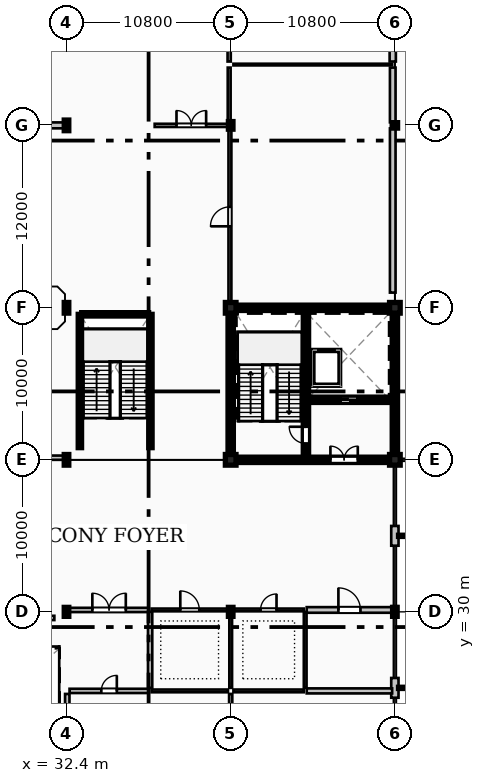
"""IFC4 building model, lengths in metres.
Left out: names, types, materials, properties, quantities, classifications, styles, units other than length and angle.
Written with IfcOpenShell. Run it as: python <this file> out.ifc"""

import sys

from ifc_helpers import new_model, si_unit, direction, frame, frame_2d, origin, origin_2d, place, context, subcontext, project, spatial, rectangle, hollow_circle, i_section, extrude, element, fill, save


model = new_model("IFC4")
c1 = context("Model", 3, precision=1e-05, world=origin(), true_north=direction((0.0, 1.0)))
c2 = subcontext(c1, "Body", "Model", "MODEL_VIEW")
j1 = project(units=[si_unit("LENGTHUNIT", "METRE"), si_unit("PLANEANGLEUNIT", "RADIAN")], contexts=[c1])
p1 = place(None, origin())
s1 = spatial("IfcSite", under=j1, at=p1, CompositionType="ELEMENT")
p2 = place(p1, origin())
s2 = spatial("IfcBuilding", under=s1, at=p2, CompositionType="ELEMENT")
p3 = place(p2, frame((0.0, 0.0, 4.8)))
s3 = spatial("IfcBuildingStorey", under=s2, at=p3, CompositionType="ELEMENT", Elevation=4.8)
p4 = place(p3, frame((32.4, 30.0, 0.0), z_axis=(0.0, 0.0, 1.0), x_axis=(1.0, 0.0, 0.0)))
e1 = element("IfcColumn", 1, at=p4, inside=s3, PredefinedType="COLUMN", context=c2, shape_type="SweptSolid", body=[
    extrude(i_section(OverallWidth=0.3, OverallDepth=0.59, WebThickness=0.013, FlangeThickness=0.025, FilletRadius=0.027, at=origin_2d()), origin(), (0.0, 0.0, 1.0), 4.8),
])
for number, where, z_axis, x_axis in (
    (2, (32.4, 40.0, 0.0), (0.0, 0.0, 1.0), (1.0, 0.0, 0.0)),
    (3, (32.4, 50.0, 0.0), (0.0, 0.0, 1.0), (1.0, 0.0, 0.0)),
    (4, (32.4, 62.0, 0.0), (0.0, 0.0, 1.0), (1.0, 0.0, 0.0)),
):
    element("IfcColumn", number, at=place(p3, frame(where, z_axis=z_axis, x_axis=x_axis)), inside=s3, PredefinedType="COLUMN", context=c2, shape_type="SweptSolid", body=[
        extrude(i_section(OverallWidth=0.3, OverallDepth=0.7, WebThickness=0.017, FlangeThickness=0.032, FilletRadius=0.027, at=origin_2d()), origin(), (0.0, 0.0, 1.0), 4.8),
    ])
p5 = place(p3, frame((43.2, 30.0, 0.0), z_axis=(0.0, 0.0, 1.0), x_axis=(1.0, 0.0, 0.0)))
e5 = element("IfcColumn", 5, at=p5, inside=s3, PredefinedType="COLUMN", context=c2, shape_type="SweptSolid", body=[
    extrude(i_section(OverallWidth=0.3, OverallDepth=0.59, WebThickness=0.013, FlangeThickness=0.025, FilletRadius=0.027, at=origin_2d()), origin(), (0.0, 0.0, 1.0), 4.8),
])
for number, where, z_axis, x_axis in (
    (6, (43.2, 40.0, 0.0), (0.0, 0.0, 1.0), (1.0, 0.0, 0.0)),
    (7, (43.2, 50.0, 0.0), (0.0, 0.0, 1.0), (1.0, 0.0, 0.0)),
):
    element("IfcColumn", number, at=place(p3, frame(where, z_axis=z_axis, x_axis=x_axis)), inside=s3, PredefinedType="COLUMN", context=c2, shape_type="SweptSolid", body=[
        extrude(rectangle(XDim=0.7, YDim=0.7, at=origin_2d()), origin(), (0.0, 0.0, 1.0), 4.8),
    ])
p6 = place(p3, frame((43.2, 62.0, 0.0), z_axis=(0.0, 0.0, 1.0), x_axis=(1.0, 0.0, 0.0)))
e8 = element("IfcColumn", 8, at=p6, inside=s3, PredefinedType="COLUMN", context=c2, shape_type="SweptSolid", body=[
    extrude(i_section(OverallWidth=0.3, OverallDepth=0.5, WebThickness=0.014, FlangeThickness=0.028, FilletRadius=0.027, at=origin_2d()), origin(), (0.0, 0.0, 1.0), 4.8),
])
p7 = place(p3, frame((54.0, 30.0, 0.0), z_axis=(0.0, 0.0, 1.0), x_axis=(1.0, 0.0, 0.0)))
e9 = element("IfcColumn", 9, at=p7, inside=s3, PredefinedType="COLUMN", context=c2, shape_type="SweptSolid", body=[
    extrude(i_section(OverallWidth=0.3, OverallDepth=0.59, WebThickness=0.013, FlangeThickness=0.025, FilletRadius=0.027, at=origin_2d()), origin(), (0.0, 0.0, 1.0), 4.8),
])
for number, where, z_axis, x_axis in (
    (10, (54.0, 40.0, 0.0), (0.0, 0.0, 1.0), (1.0, 0.0, 0.0)),
    (11, (54.0, 50.0, 0.0), (0.0, 0.0, 1.0), (1.0, 0.0, 0.0)),
):
    element("IfcColumn", number, at=place(p3, frame(where, z_axis=z_axis, x_axis=x_axis)), inside=s3, PredefinedType="COLUMN", context=c2, shape_type="SweptSolid", body=[
        extrude(rectangle(XDim=0.7, YDim=0.7, at=origin_2d()), origin(), (0.0, 0.0, 1.0), 4.8),
    ])
p8 = place(p3, frame((54.0, 62.0, 0.0), z_axis=(0.0, 0.0, 1.0), x_axis=(1.0, 0.0, 0.0)))
e12 = element("IfcColumn", 12, at=p8, inside=s3, PredefinedType="COLUMN", context=c2, shape_type="SweptSolid", body=[
    extrude(hollow_circle(Radius=0.178, WallThickness=0.016, at=origin_2d()), origin(), (0.0, 0.0, 1.0), 4.8),
])
p9 = place(p3, frame((54.0, 24.35, 0.0), z_axis=(0.0, 0.0, 1.0), x_axis=(0.0, 1.0, 0.0)))
e13 = element("IfcWall", 13, at=p9, inside=s3, PredefinedType="STANDARD", context=c2, shape_type="SweptSolid", body=[
    extrude(rectangle(XDim=1.3, YDim=0.48, at=frame_2d((0.65, 0.0))), origin(), (0.0, 0.0, 1.0), 4.56),
])
p10 = place(p3, frame((54.0, 29.63, 0.0), z_axis=(0.0, 0.0, 1.0), x_axis=(0.0, 1.0, 0.0)))
e14 = element("IfcWall", 14, at=p10, inside=s3, PredefinedType="STANDARD", context=c2, shape_type="SweptSolid", body=[
    extrude(rectangle(XDim=0.225, YDim=0.3, at=frame_2d((0.113, 0.0))), origin(), (0.0, 0.0, 1.0), 4.56),
])
p11 = place(p3, frame((54.0, 34.35, 0.0), z_axis=(0.0, 0.0, 1.0), x_axis=(0.0, 1.0, 0.0)))
e15 = element("IfcWall", 15, at=p11, inside=s3, PredefinedType="STANDARD", context=c2, shape_type="SweptSolid", body=[
    extrude(rectangle(XDim=1.3, YDim=0.48, at=frame_2d((0.65, 0.0))), origin(), (0.0, 0.0, 1.0), 4.56),
])
for number, where, z_axis, x_axis in (
    (16, (54.0, 30.145, 0.0), (0.0, 0.0, 1.0), (0.0, 1.0, 0.0)),
    (17, (54.0, 39.63, 0.0), (0.0, 0.0, 1.0), (0.0, 1.0, 0.0)),
    (18, (54.145, 40.0, 0.0), (0.0, 0.0, 1.0), (1.0, 0.0, 0.0)),
):
    element("IfcWall", number, at=place(p3, frame(where, z_axis=z_axis, x_axis=x_axis)), inside=s3, PredefinedType="STANDARD", context=c2, shape_type="SweptSolid", body=[
        extrude(rectangle(XDim=0.225, YDim=0.3, at=frame_2d((0.113, 0.0))), origin(), (0.0, 0.0, 1.0), 4.56),
    ])
p12 = place(p3, frame((43.55, 40.0, 0.0), z_axis=(0.0, 0.0, 1.0), x_axis=(1.0, 0.0, 0.0)))
e19 = element("IfcWall", 19, at=p12, inside=s3, PredefinedType="SHEAR", context=c2, shape_type="SweptSolid", body=[
    extrude(rectangle(XDim=10.1, YDim=0.35, at=frame_2d((5.05, 0.0))), origin(), (0.0, 0.0, 1.0), 4.56),
])
p13 = place(p12, frame((6.21, 0.0, 0.0)))
e20 = element("IfcOpeningElement", 20, at=p13, cuts=e19, PredefinedType="OPENING", context=c2, shape_type="SweptSolid", body=[
    extrude(rectangle(XDim=1.8, YDim=2.25, at=frame_2d((0.9, 1.125))), frame((0.0, 0.185, 0.0), z_axis=(0.0, -1.0, 0.0), x_axis=(1.0, 0.0, 0.0)), (0.0, 0.0, 1.0), 0.37),
])
p14 = place(p3, frame((43.55, 50.0, 0.0), z_axis=(0.0, 0.0, 1.0), x_axis=(1.0, 0.0, 0.0)))
e21 = element("IfcWall", 21, at=p14, inside=s3, PredefinedType="SHEAR", context=c2, shape_type="SweptSolid", body=[
    extrude(rectangle(XDim=10.1, YDim=0.35, at=frame_2d((5.05, 0.0))), origin(), (0.0, 0.0, 1.0), 4.56),
])
for number, where, z_axis, x_axis in (
    (22, (43.2, 40.35, 0.0), (0.0, 0.0, 1.0), (0.0, 1.0, 0.0)),
    (23, (54.0, 40.35, 0.0), (0.0, 0.0, 1.0), (0.0, 1.0, 0.0)),
):
    element("IfcWall", number, at=place(p3, frame(where, z_axis=z_axis, x_axis=x_axis)), inside=s3, PredefinedType="SHEAR", context=c2, shape_type="SweptSolid", body=[
        extrude(rectangle(XDim=9.3, YDim=0.35, at=frame_2d((4.65, 0.0))), origin(), (0.0, 0.0, 1.0), 4.56),
    ])
p15 = place(p3, frame((48.15, 40.175, 0.0), z_axis=(0.0, 0.0, 1.0), x_axis=(0.0, 1.0, 0.0)))
e24 = element("IfcWall", 24, at=p15, inside=s3, PredefinedType="SHEAR", context=c2, shape_type="SweptSolid", body=[
    extrude(rectangle(XDim=9.65, YDim=0.35, at=frame_2d((4.825, 0.0))), origin(), (0.0, 0.0, 1.0), 4.56),
])
p16 = place(p15, frame((0.9, 0.0, 0.0)))
e25 = element("IfcOpeningElement", 25, at=p16, cuts=e24, PredefinedType="OPENING", context=c2, shape_type="SweptSolid", body=[
    extrude(rectangle(XDim=1.1, YDim=2.2, at=frame_2d((0.55, 1.1))), frame((0.0, 0.185, 0.0), z_axis=(0.0, -1.0, 0.0), x_axis=(1.0, 0.0, 0.0)), (0.0, 0.0, 1.0), 0.37),
])
p17 = place(p3, frame((48.33, 43.95, 0.0), z_axis=(0.0, 0.0, 1.0), x_axis=(1.0, 0.0, 0.0)))
e26 = element("IfcWall", 26, at=p17, inside=s3, PredefinedType="SHEAR", context=c2, shape_type="SweptSolid", body=[
    extrude(rectangle(XDim=5.49, YDim=0.35, at=frame_2d((2.745, 0.0))), origin(), (0.0, 0.0, 1.0), 4.56),
])
p18 = place(p17, frame((2.1, 0.0, 0.0)))
e27 = element("IfcOpeningElement", 27, at=p18, cuts=e26, PredefinedType="OPENING", context=c2, shape_type="SweptSolid", body=[
    extrude(rectangle(XDim=1.1, YDim=2.2, at=frame_2d((0.55, 1.1))), frame((0.0, 0.185, 0.0), z_axis=(0.0, -1.0, 0.0), x_axis=(1.0, 0.0, 0.0)), (0.0, 0.0, 1.0), 0.37),
])
for number, where, z_axis, x_axis in (
    (28, (33.28, 40.8, 0.0), (0.0, 0.0, 1.0), (0.0, 1.0, 0.0)),
    (29, (37.92, 40.8, 0.0), (0.0, 0.0, 1.0), (0.0, 1.0, 0.0)),
):
    element("IfcWall", number, at=place(p3, frame(where, z_axis=z_axis, x_axis=x_axis)), inside=s3, PredefinedType="SHEAR", context=c2, shape_type="SweptSolid", body=[
        extrude(rectangle(XDim=8.77, YDim=0.22, at=frame_2d((4.385, 0.0))), origin(), (0.0, 0.0, 1.0), 4.56),
    ])
p19 = place(p3, frame((33.4, 49.57, 0.0), z_axis=(0.0, 0.0, 1.0), x_axis=(1.0, 0.0, 0.0)))
e30 = element("IfcWall", 30, at=p19, inside=s3, PredefinedType="SHEAR", context=c2, shape_type="SweptSolid", body=[
    extrude(rectangle(XDim=4.4, YDim=0.22, at=frame_2d((2.2, 0.0))), origin(), (0.0, 0.0, 1.0), 4.56),
])
p20 = place(p3, frame((32.6, 24.8, 0.0), z_axis=(0.0, 0.0, 1.0), x_axis=(1.0, 0.0, 0.0)))
e31 = element("IfcWall", 31, at=p20, inside=s3, PredefinedType="SOLIDWALL", context=c2, shape_type="SweptSolid", body=[
    extrude(rectangle(XDim=5.2, YDim=0.28, at=frame_2d((2.6, 0.0))), origin(), (0.0, 0.0, 1.0), 4.52),
])
p21 = place(p20, frame((2.09, 0.0, 0.0)))
e32 = element("IfcOpeningElement", 32, at=p21, cuts=e31, PredefinedType="OPENING", context=c2, shape_type="SweptSolid", body=[
    extrude(rectangle(XDim=1.02, YDim=2.15, at=frame_2d((0.51, 1.075))), frame((0.0, 0.15, 0.0), z_axis=(0.0, -1.0, 0.0), x_axis=(1.0, 0.0, 0.0)), (0.0, 0.0, 1.0), 0.3),
])
p22 = place(p3, frame((21.8, 29.6, 0.0), z_axis=(0.0, 0.0, 1.0), x_axis=(1.0, 0.0, 0.0)))
e33 = element("IfcWall", 33, at=p22, inside=s3, PredefinedType="SOLIDWALL", context=c2, shape_type="SweptSolid", body=[
    extrude(rectangle(XDim=9.8, YDim=0.28, at=frame_2d((4.9, 0.0))), origin(), (0.0, 0.0, 1.0), 4.52),
])
p23 = place(p3, frame((32.6, 30.125, 0.0), z_axis=(0.0, 0.0, 1.0), x_axis=(1.0, 0.0, 0.0)))
e34 = element("IfcWall", 34, at=p23, inside=s3, PredefinedType="SOLIDWALL", context=c2, shape_type="SweptSolid", body=[
    extrude(rectangle(XDim=5.2, YDim=0.28, at=frame_2d((2.6, 0.0))), origin(), (0.0, 0.0, 1.0), 4.059),
])
p24 = place(p23, frame((1.5, 0.0, 0.0)))
e35 = element("IfcOpeningElement", 35, at=p24, cuts=e34, PredefinedType="OPENING", context=c2, shape_type="SweptSolid", body=[
    extrude(rectangle(XDim=2.2, YDim=2.5, at=frame_2d((1.1, 1.25))), frame((0.0, 0.15, 0.0), z_axis=(0.0, -1.0, 0.0), x_axis=(1.0, 0.0, 0.0)), (0.0, 0.0, 1.0), 0.3),
])
p25 = place(p3, frame((38.0, 30.125, 0.0), z_axis=(0.0, 0.0, 1.0), x_axis=(1.0, 0.0, 0.0)))
e36 = element("IfcWall", 36, at=p25, inside=s3, PredefinedType="PLUMBINGWALL", context=c2, shape_type="SweptSolid", body=[
    extrude(rectangle(XDim=5.02, YDim=0.18, at=frame_2d((2.51, 0.0))), origin(), (0.0, 0.0, 1.0), 4.059),
])
p26 = place(p25, frame((1.885, 0.0, 0.0)))
e37 = element("IfcOpeningElement", 37, at=p26, cuts=e36, PredefinedType="OPENING", context=c2, shape_type="SweptSolid", body=[
    extrude(rectangle(XDim=1.25, YDim=2.3, at=frame_2d((0.625, 1.15))), frame((0.0, 0.1, 0.0), z_axis=(0.0, -1.0, 0.0), x_axis=(1.0, 0.0, 0.0)), (0.0, 0.0, 1.0), 0.2),
])
p27 = place(p3, frame((43.38, 30.125, 0.0), z_axis=(0.0, 0.0, 1.0), x_axis=(1.0, 0.0, 0.0)))
e38 = element("IfcWall", 38, at=p27, inside=s3, PredefinedType="PLUMBINGWALL", context=c2, shape_type="SweptSolid", body=[
    extrude(rectangle(XDim=4.62, YDim=0.18, at=frame_2d((2.31, 0.0))), origin(), (0.0, 0.0, 1.0), 4.059),
])
p28 = place(p27, frame((1.785, 0.0, 0.0)))
e39 = element("IfcOpeningElement", 39, at=p28, cuts=e38, PredefinedType="OPENING", context=c2, shape_type="SweptSolid", body=[
    extrude(rectangle(XDim=1.05, YDim=2.15, at=frame_2d((0.525, 1.075))), frame((0.0, 0.1, 0.0), z_axis=(0.0, -1.0, 0.0), x_axis=(1.0, 0.0, 0.0)), (0.0, 0.0, 1.0), 0.2),
])
p29 = place(p3, frame((48.2, 30.125, 0.0), z_axis=(0.0, 0.0, 1.0), x_axis=(1.0, 0.0, 0.0)))
e40 = element("IfcWall", 40, at=p29, inside=s3, PredefinedType="PARTITIONING", context=c2, shape_type="SweptSolid", body=[
    extrude(rectangle(XDim=5.62, YDim=0.37, at=frame_2d((2.81, 0.0))), origin(), (0.0, 0.0, 1.0), 4.059),
])
p30 = place(p29, frame((2.085, 0.0, 0.0)))
e41 = element("IfcOpeningElement", 41, at=p30, cuts=e40, PredefinedType="OPENING", context=c2, shape_type="SweptSolid", body=[
    extrude(rectangle(XDim=1.45, YDim=2.35, at=frame_2d((0.725, 1.175))), frame((0.0, 0.195, 0.0), z_axis=(0.0, -1.0, 0.0), x_axis=(1.0, 0.0, 0.0)), (0.0, 0.0, 1.0), 0.39),
])
p31 = place(p3, frame((21.8, 40.14, 0.0), z_axis=(0.0, 0.0, 1.0), x_axis=(1.0, 0.0, 0.0)))
e42 = element("IfcWall", 42, at=p31, inside=s3, PredefinedType="SOLIDWALL", context=c2, shape_type="SweptSolid", body=[
    extrude(rectangle(XDim=10.4, YDim=0.28, at=frame_2d((5.2, 0.0))), origin(), (0.0, 0.0, 1.0), 3.939),
])
p32 = place(p3, frame((38.2, 62.0, 0.0), z_axis=(0.0, 0.0, 1.0), x_axis=(1.0, 0.0, 0.0)))
e43 = element("IfcWall", 43, at=p32, inside=s3, PredefinedType="PARTITIONING", context=c2, shape_type="SweptSolid", body=[
    extrude(rectangle(XDim=4.82, YDim=0.21, at=frame_2d((2.41, 0.0))), origin(), (0.0, 0.0, 1.0), 4.049),
])
p33 = place(p32, frame((1.435, 0.0, 0.0)))
e44 = element("IfcOpeningElement", 44, at=p33, cuts=e43, PredefinedType="OPENING", context=c2, shape_type="SweptSolid", body=[
    extrude(rectangle(XDim=1.95, YDim=2.5, at=frame_2d((0.975, 1.25))), frame((0.0, 0.115, 0.0), z_axis=(0.0, -1.0, 0.0), x_axis=(1.0, 0.0, 0.0)), (0.0, 0.0, 1.0), 0.23),
])
p34 = place(p3, frame((43.15, 50.18, 0.0), z_axis=(0.0, 0.0, 1.0), x_axis=(0.0, 1.0, 0.0)))
e45 = element("IfcWall", 45, at=p34, inside=s3, PredefinedType="PARTITIONING", context=c2, shape_type="SweptSolid", body=[
    extrude(rectangle(XDim=11.64, YDim=0.19, at=frame_2d((5.82, 0.0))), origin(), (0.0, 0.0, 1.0), 3.939),
])
p35 = place(p34, frame((5.18, 0.0, 0.0)))
e46 = element("IfcOpeningElement", 46, at=p35, cuts=e45, PredefinedType="OPENING", context=c2, shape_type="SweptSolid", body=[
    extrude(rectangle(XDim=1.28, YDim=2.32, at=frame_2d((0.64, 1.16))), frame((0.0, 0.105, 0.0), z_axis=(0.0, -1.0, 0.0), x_axis=(1.0, 0.0, 0.0)), (0.0, 0.0, 1.0), 0.21),
])
p36 = place(p3, frame((43.2, 20.2, 0.0), z_axis=(0.0, 0.0, 1.0), x_axis=(0.0, 1.0, 0.0)))
e47 = element("IfcWall", 47, at=p36, inside=s3, PredefinedType="PARTITIONING", context=c2, shape_type="SweptSolid", body=[
    extrude(rectangle(XDim=4.4, YDim=0.21, at=frame_2d((2.2, 0.0))), origin(), (0.0, 0.0, 1.0), 4.05),
])
p37 = place(p3, frame((38.0, 24.8, 0.0), z_axis=(0.0, 0.0, 1.0), x_axis=(1.0, 0.0, 0.0)))
e48 = element("IfcWall", 48, at=p37, inside=s3, PredefinedType="PLUMBINGWALL", context=c2, shape_type="SweptSolid", body=[
    extrude(rectangle(XDim=5.02, YDim=0.18, at=frame_2d((2.51, 0.0))), origin(), (0.0, 0.0, 1.0), 4.52),
])
p38 = place(p3, frame((43.38, 24.8, 0.0), z_axis=(0.0, 0.0, 1.0), x_axis=(1.0, 0.0, 0.0)))
e49 = element("IfcWall", 49, at=p38, inside=s3, PredefinedType="PLUMBINGWALL", context=c2, shape_type="SweptSolid", body=[
    extrude(rectangle(XDim=4.62, YDim=0.18, at=frame_2d((2.31, 0.0))), origin(), (0.0, 0.0, 1.0), 4.52),
])
p39 = place(p3, frame((48.2, 24.8, 0.0), z_axis=(0.0, 0.0, 1.0), x_axis=(1.0, 0.0, 0.0)))
e50 = element("IfcWall", 50, at=p39, inside=s3, PredefinedType="PARTITIONING", context=c2, shape_type="SweptSolid", body=[
    extrude(rectangle(XDim=5.62, YDim=0.33, at=frame_2d((2.81, 0.0))), origin(), (0.0, 0.0, 1.0), 4.52),
])
p40 = place(p3, frame((21.8, 62.0, 0.0), z_axis=(0.0, 0.0, 1.0), x_axis=(1.0, 0.0, 0.0)))
e51 = element("IfcWall", 51, at=p40, inside=s3, PredefinedType="PARTITIONING", context=c2, shape_type="SweptSolid", body=[
    extrude(rectangle(XDim=10.4, YDim=0.39, at=frame_2d((5.2, 0.0))), origin(), (0.0, 0.0, 1.0), 3.939),
])
p41 = place(p3, frame((43.38, 66.0, 0.0), z_axis=(0.0, 0.0, 1.0), x_axis=(1.0, 0.0, 0.0)))
e52 = element("IfcWall", 52, at=p41, inside=s3, PredefinedType="PARTITIONING", context=c2, shape_type="SweptSolid", body=[
    extrude(rectangle(XDim=10.44, YDim=0.11, at=frame_2d((5.22, 0.0))), origin(), (0.0, 0.0, 1.0), 4.52),
])
p42 = place(p3, frame((37.9, 25.0, 0.0), z_axis=(0.0, 0.0, 1.0), x_axis=(0.0, 1.0, 0.0)))
e53 = element("IfcWall", 53, at=p42, inside=s3, PredefinedType="SOLIDWALL", context=c2, shape_type="SweptSolid", body=[
    extrude(rectangle(XDim=5.0, YDim=0.28, at=frame_2d((2.5, 0.0))), origin(), (0.0, 0.0, 1.0), 4.52),
])
p43 = place(p3, frame((43.1, 62.18, 0.0), z_axis=(0.0, 0.0, 1.0), x_axis=(0.0, 1.0, 0.0)))
e54 = element("IfcWall", 54, at=p43, inside=s3, PredefinedType="PARTITIONING", context=c2, shape_type="SweptSolid", body=[
    extrude(rectangle(XDim=3.62, YDim=0.19, at=frame_2d((1.81, 0.0))), origin(), (0.0, 0.0, 1.0), 4.04),
])
p44 = place(p3, frame((43.1, 66.2, 0.0), z_axis=(0.0, 0.0, 1.0), x_axis=(0.0, 1.0, 0.0)))
e55 = element("IfcWall", 55, at=p44, inside=s3, PredefinedType="PARTITIONING", context=c2, shape_type="SweptSolid", body=[
    extrude(rectangle(XDim=5.6, YDim=0.21, at=frame_2d((2.8, 0.0))), origin(), (0.0, 0.0, 1.0), 4.04),
])
p45 = place(p3, frame((43.2, 25.0, 0.0), z_axis=(0.0, 0.0, 1.0), x_axis=(0.0, 1.0, 0.0)))
e56 = element("IfcWall", 56, at=p45, inside=s3, PredefinedType="PLUMBINGWALL", context=c2, shape_type="SweptSolid", body=[
    extrude(rectangle(XDim=5.0, YDim=0.18, at=frame_2d((2.5, 0.0))), origin(), (0.0, 0.0, 1.0), 4.05),
])
p46 = place(p3, frame((48.1, 25.0, 0.0), z_axis=(0.0, 0.0, 1.0), x_axis=(0.0, 1.0, 0.0)))
e57 = element("IfcWall", 57, at=p46, inside=s3, PredefinedType="PLUMBINGWALL", context=c2, shape_type="SweptSolid", body=[
    extrude(rectangle(XDim=5.0, YDim=0.18, at=frame_2d((2.5, 0.0))), origin(), (0.0, 0.0, 1.0), 4.52),
])
p47 = place(p3, frame((53.86, 51.0, 0.0), z_axis=(0.0, 0.0, 1.0), x_axis=(0.0, 1.0, 0.0)))
e58 = element("IfcWall", 58, at=p47, inside=s3, PredefinedType="PARTITIONING", context=c2, shape_type="SweptSolid", body=[
    extrude(rectangle(XDim=10.8, YDim=0.37, at=frame_2d((5.4, 0.0))), origin(), (0.0, 0.0, 1.0), 4.52),
])
p48 = place(p3, frame((53.86, 62.2, 0.0), z_axis=(0.0, 0.0, 1.0), x_axis=(0.0, 1.0, 0.0)))
e59 = element("IfcWall", 59, at=p48, inside=s3, PredefinedType="PARTITIONING", context=c2, shape_type="SweptSolid", body=[
    extrude(rectangle(XDim=3.6, YDim=0.37, at=frame_2d((1.8, 0.0))), origin(), (0.0, 0.0, 1.0), 4.52),
])
p49 = place(p3, frame((53.86, 66.2, 0.0), z_axis=(0.0, 0.0, 1.0), x_axis=(0.0, 1.0, 0.0)))
e60 = element("IfcWall", 60, at=p49, inside=s3, PredefinedType="PARTITIONING", context=c2, shape_type="SweptSolid", body=[
    extrude(rectangle(XDim=4.8, YDim=0.41, at=frame_2d((2.4, 0.0))), origin(), (0.0, 0.0, 1.0), 4.52),
])
p50 = place(p3, frame((32.45, 20.2, 0.0), z_axis=(0.0, 0.0, 1.0), x_axis=(0.0, 1.0, 0.0)))
e61 = element("IfcWall", 61, at=p50, inside=s3, PredefinedType="PARTITIONING", context=c2, shape_type="SweptSolid", body=[
    extrude(rectangle(XDim=4.4, YDim=0.29, at=frame_2d((2.2, 0.0))), origin(), (0.0, 0.0, 1.0), 4.05),
])
p51 = place(p16, origin())
e62 = element("IfcDoor", 62, at=p51, inside=s3, OperationType="SINGLE_SWING_RIGHT", PredefinedType="DOOR", context=c2, shape_type="SweptSolid", body=[
    extrude(rectangle(XDim=1.1, YDim=2.2, at=frame_2d((0.55, 1.1))), frame((0.0, 0.025, 0.0), z_axis=(0.0, -1.0, 0.0), x_axis=(1.0, 0.0, 0.0)), (0.0, 0.0, 1.0), 0.05),
])
fill(e25, e62)
p52 = place(p13, origin())
e63 = element("IfcDoor", 63, at=p52, inside=s3, OperationType="DOUBLE_DOOR_SINGLE_SWING", PredefinedType="DOOR", context=c2, shape_type="SweptSolid", body=[
    extrude(rectangle(XDim=1.8, YDim=2.25, at=frame_2d((0.9, 1.125))), frame((0.0, 0.025, 0.0), z_axis=(0.0, -1.0, 0.0), x_axis=(1.0, 0.0, 0.0)), (0.0, 0.0, 1.0), 0.05),
])
fill(e20, e63)
p53 = place(p18, origin())
e64 = element("IfcDoor", 64, at=p53, inside=s3, OperationType="DOUBLE_DOOR_SLIDING", PredefinedType="DOOR", context=c2, shape_type="SweptSolid", body=[
    extrude(rectangle(XDim=1.1, YDim=2.2, at=frame_2d((0.55, 1.1))), frame((0.0, 0.025, 0.0), z_axis=(0.0, -1.0, 0.0), x_axis=(1.0, 0.0, 0.0)), (0.0, 0.0, 1.0), 0.05),
])
fill(e27, e64)
p54 = place(p21, origin())
e65 = element("IfcDoor", 65, at=p54, inside=s3, OperationType="SINGLE_SWING_RIGHT", PredefinedType="DOOR", context=c2, shape_type="SweptSolid", body=[
    extrude(rectangle(XDim=1.02, YDim=2.15, at=frame_2d((0.51, 1.075))), frame((0.0, 0.025, 0.0), z_axis=(0.0, -1.0, 0.0), x_axis=(1.0, 0.0, 0.0)), (0.0, 0.0, 1.0), 0.05),
])
fill(e32, e65)
p55 = place(p24, origin())
e66 = element("IfcDoor", 66, at=p55, inside=s3, OperationType="DOUBLE_DOOR_SINGLE_SWING", PredefinedType="DOOR", context=c2, shape_type="SweptSolid", body=[
    extrude(rectangle(XDim=2.2, YDim=2.5, at=frame_2d((1.1, 1.25))), frame((0.0, 0.025, 0.0), z_axis=(0.0, -1.0, 0.0), x_axis=(1.0, 0.0, 0.0)), (0.0, 0.0, 1.0), 0.05),
])
fill(e35, e66)
p56 = place(p26, origin())
e67 = element("IfcDoor", 67, at=p56, inside=s3, OperationType="SINGLE_SWING_LEFT", PredefinedType="DOOR", context=c2, shape_type="SweptSolid", body=[
    extrude(rectangle(XDim=1.25, YDim=2.3, at=frame_2d((0.625, 1.15))), frame((0.0, 0.025, 0.0), z_axis=(0.0, -1.0, 0.0), x_axis=(1.0, 0.0, 0.0)), (0.0, 0.0, 1.0), 0.05),
])
fill(e37, e67)
p57 = place(p28, origin())
e68 = element("IfcDoor", 68, at=p57, inside=s3, OperationType="SINGLE_SWING_RIGHT", PredefinedType="DOOR", context=c2, shape_type="SweptSolid", body=[
    extrude(rectangle(XDim=1.05, YDim=2.15, at=frame_2d((0.525, 1.075))), frame((0.0, 0.025, 0.0), z_axis=(0.0, -1.0, 0.0), x_axis=(1.0, 0.0, 0.0)), (0.0, 0.0, 1.0), 0.05),
])
fill(e39, e68)
p58 = place(p30, origin())
e69 = element("IfcDoor", 69, at=p58, inside=s3, OperationType="SINGLE_SWING_LEFT", PredefinedType="DOOR", context=c2, shape_type="SweptSolid", body=[
    extrude(rectangle(XDim=1.45, YDim=2.35, at=frame_2d((0.725, 1.175))), frame((0.0, 0.025, 0.0), z_axis=(0.0, -1.0, 0.0), x_axis=(1.0, 0.0, 0.0)), (0.0, 0.0, 1.0), 0.05),
])
fill(e41, e69)
p59 = place(p33, origin())
e70 = element("IfcDoor", 70, at=p59, inside=s3, OperationType="DOUBLE_DOOR_SINGLE_SWING", PredefinedType="DOOR", context=c2, shape_type="SweptSolid", body=[
    extrude(rectangle(XDim=1.95, YDim=2.5, at=frame_2d((0.975, 1.25))), frame((0.0, 0.025, 0.0), z_axis=(0.0, -1.0, 0.0), x_axis=(1.0, 0.0, 0.0)), (0.0, 0.0, 1.0), 0.05),
])
fill(e44, e70)
p60 = place(p35, origin())
e71 = element("IfcDoor", 71, at=p60, inside=s3, OperationType="SINGLE_SWING_LEFT", PredefinedType="DOOR", context=c2, shape_type="SweptSolid", body=[
    extrude(rectangle(XDim=1.28, YDim=2.32, at=frame_2d((0.64, 1.16))), frame((0.0, 0.025, 0.0), z_axis=(0.0, -1.0, 0.0), x_axis=(1.0, 0.0, 0.0)), (0.0, 0.0, 1.0), 0.05),
])
fill(e46, e71)
save(model, sys.argv[1])
